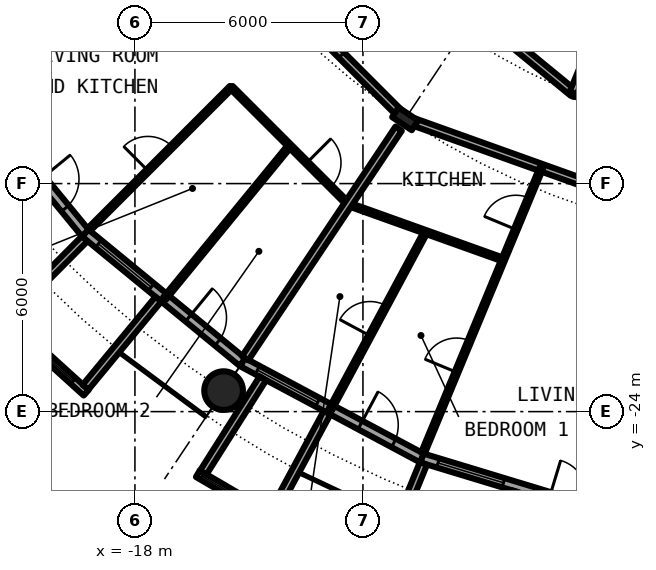
"""IFC4 building model, lengths in metres.
Left out: names, types, materials, properties, quantities, classifications, styles, units other than length and angle.
Written with IfcOpenShell. Run it as: python <this file> out.ifc"""

import sys

from ifc_helpers import new_model, si_unit, direction, frame, frame_2d, origin, origin_2d, place, context, subcontext, project, spatial, rectangle, circle, hollow_circle, i_section, extrude, element, fill, save


model = new_model("IFC4")
c1 = context("Model", 3, precision=1e-05, world=origin(), true_north=direction((0.0, 1.0)))
c2 = subcontext(c1, "Body", "Model", "MODEL_VIEW")
j1 = project(units=[si_unit("LENGTHUNIT", "METRE"), si_unit("PLANEANGLEUNIT", "RADIAN")], contexts=[c1])
p1 = place(None, origin())
s1 = spatial("IfcSite", under=j1, at=p1, CompositionType="ELEMENT")
p2 = place(p1, origin())
s2 = spatial("IfcBuilding", under=s1, at=p2, CompositionType="ELEMENT")
p3 = place(p2, frame((0.0, 0.0, 22.8)))
s3 = spatial("IfcBuildingStorey", under=s2, at=p3, CompositionType="ELEMENT", Elevation=22.8)
p4 = place(p3, frame((-15.667, -23.448, 0.0), z_axis=(0.0, 0.0, 1.0), x_axis=(1.0, 0.0, 0.0)))
e1 = element("IfcColumn", 1, at=p4, inside=s3, PredefinedType="COLUMN", context=c2, shape_type="SweptSolid", body=[
    extrude(hollow_circle(Radius=0.508, WallThickness=0.05, at=origin_2d()), origin(), (0.0, 0.0, 1.0), 3.05),
])
p5 = place(p3, frame((-10.889, -16.297, 0.0), z_axis=(0.0, 0.0, 1.0), x_axis=(-0.55557023302, -0.831469612303, 0.0)))
e2 = element("IfcColumn", 2, at=p5, inside=s3, PredefinedType="COLUMN", context=c2, shape_type="SweptSolid", body=[
    extrude(i_section(OverallWidth=0.305, OverallDepth=0.62, WebThickness=0.021, FlangeThickness=0.04, FilletRadius=0.027, at=origin_2d()), origin(), (0.0, 0.0, 1.0), 3.05),
])
p6 = place(p3, frame((-22.699, -15.167, 0.0), z_axis=(0.0, 0.0, 1.0), x_axis=(0.634382322723, -0.773019449054, 0.0)))
e3 = element("IfcWall", 3, at=p6, inside=s3, PredefinedType="SOLIDWALL", context=c2, shape_type="SweptSolid", body=[
    extrude(rectangle(XDim=5.352, YDim=0.25, at=frame_2d((2.676, 0.0))), origin(), (0.0, 0.0, 1.0), 2.7),
])
p7 = place(p6, frame((0.441, 0.0, 0.3)))
e4 = element("IfcOpeningElement", 4, at=p7, cuts=e3, PredefinedType="OPENING", context=c2, shape_type="SweptSolid", body=[
    extrude(rectangle(XDim=1.8, YDim=2.1, at=frame_2d((0.9, 1.05))), frame((0.0, 0.135, 0.0), z_axis=(0.0, -1.0, 0.0), x_axis=(1.0, 0.0, 0.0)), (0.0, 0.0, 1.0), 0.27),
])
p8 = place(p6, frame((3.51, 0.0, 0.0)))
e5 = element("IfcOpeningElement", 5, at=p8, cuts=e3, PredefinedType="OPENING", context=c2, shape_type="SweptSolid", body=[
    extrude(rectangle(XDim=1.0, YDim=2.2, at=frame_2d((0.5, 1.1))), frame((0.0, 0.135, 0.0), z_axis=(0.0, -1.0, 0.0), x_axis=(1.0, 0.0, 0.0)), (0.0, 0.0, 1.0), 0.27),
])
p9 = place(p3, frame((-19.304, -19.304, 0.0), z_axis=(0.0, 0.0, 1.0), x_axis=(0.773019449054, -0.634382322723, 0.0)))
e6 = element("IfcWall", 6, at=p9, inside=s3, PredefinedType="SOLIDWALL", context=c2, shape_type="SweptSolid", body=[
    extrude(rectangle(XDim=5.352, YDim=0.25, at=frame_2d((2.676, 0.0))), origin(), (0.0, 0.0, 1.0), 2.7),
])
p10 = place(p9, frame((0.441, 0.0, 0.3)))
e7 = element("IfcOpeningElement", 7, at=p10, cuts=e6, PredefinedType="OPENING", context=c2, shape_type="SweptSolid", body=[
    extrude(rectangle(XDim=1.8, YDim=2.1, at=frame_2d((0.9, 1.05))), frame((0.0, 0.135, 0.0), z_axis=(0.0, -1.0, 0.0), x_axis=(1.0, 0.0, 0.0)), (0.0, 0.0, 1.0), 0.27),
])
p11 = place(p9, frame((3.51, 0.0, 0.0)))
e8 = element("IfcOpeningElement", 8, at=p11, cuts=e6, PredefinedType="OPENING", context=c2, shape_type="SweptSolid", body=[
    extrude(rectangle(XDim=1.0, YDim=2.2, at=frame_2d((0.5, 1.1))), frame((0.0, 0.135, 0.0), z_axis=(0.0, -1.0, 0.0), x_axis=(1.0, 0.0, 0.0)), (0.0, 0.0, 1.0), 0.27),
])
p12 = place(p3, frame((-21.5, -21.493, -0.03), z_axis=(0.0, 0.0, 1.0), x_axis=(0.740998365753, -0.671506829416, 0.0)))
e9 = element("IfcWall", 9, at=p12, inside=s3, PredefinedType="SOLIDWALL", context=c2, shape_type="SweptSolid", body=[
    extrude(rectangle(XDim=2.993, YDim=0.2, at=frame_2d((1.497, 0.0))), origin(), (0.0, 0.0, 1.0), 2.73),
])
p13 = place(p12, frame((0.457, 0.0, 0.33)))
e10 = element("IfcOpeningElement", 10, at=p13, cuts=e9, PredefinedType="OPENING", context=c2, shape_type="SweptSolid", body=[
    extrude(circle(Radius=1.04, at=frame_2d((1.04, 1.04))), frame((0.0, 0.11, 0.0), z_axis=(0.0, -1.0, 0.0), x_axis=(1.0, 0.0, 0.0)), (0.0, 0.0, 1.0), 0.22),
])
p14 = place(p3, frame((-19.323, -19.45, -0.03), z_axis=(0.0, 0.0, 1.0), x_axis=(-0.704476739375, -0.709727076896, 0.0)))
e11 = element("IfcWall", 11, at=p14, inside=s3, PredefinedType="SOLIDWALL", context=c2, shape_type="SweptSolid", body=[
    extrude(rectangle(XDim=2.883, YDim=0.2, at=frame_2d((1.441, 0.0))), origin(), (0.0, 0.0, 1.0), 2.73),
])
p15 = place(p3, frame((-17.384, -21.041, -0.03), z_axis=(0.0, 0.0, 1.0), x_axis=(-0.63709551667, -0.770784861449, 0.0)))
e12 = element("IfcWall", 12, at=p15, inside=s3, PredefinedType="SOLIDWALL", context=c2, shape_type="SweptSolid", body=[
    extrude(rectangle(XDim=3.006, YDim=0.2, at=frame_2d((1.503, 0.0))), origin(), (0.0, 0.0, 1.0), 2.73),
])
p16 = place(p3, frame((-15.167, -22.699, 0.0), z_axis=(0.0, 0.0, 1.0), x_axis=(0.881915646801, -0.471407246368, 0.0)))
e13 = element("IfcWall", 13, at=p16, inside=s3, PredefinedType="SOLIDWALL", context=c2, shape_type="SweptSolid", body=[
    extrude(rectangle(XDim=5.352, YDim=0.25, at=frame_2d((2.676, 0.0))), origin(), (0.0, 0.0, 1.0), 2.7),
])
p17 = place(p16, frame((0.441, 0.0, 0.3)))
e14 = element("IfcOpeningElement", 14, at=p17, cuts=e13, PredefinedType="OPENING", context=c2, shape_type="SweptSolid", body=[
    extrude(rectangle(XDim=1.8, YDim=2.1, at=frame_2d((0.9, 1.05))), frame((0.0, 0.135, 0.0), z_axis=(0.0, -1.0, 0.0), x_axis=(1.0, 0.0, 0.0)), (0.0, 0.0, 1.0), 0.27),
])
p18 = place(p16, frame((3.51, 0.0, 0.0)))
e15 = element("IfcOpeningElement", 15, at=p18, cuts=e13, PredefinedType="OPENING", context=c2, shape_type="SweptSolid", body=[
    extrude(rectangle(XDim=1.0, YDim=2.2, at=frame_2d((0.5, 1.1))), frame((0.0, 0.135, 0.0), z_axis=(0.0, -1.0, 0.0), x_axis=(1.0, 0.0, 0.0)), (0.0, 0.0, 1.0), 0.27),
])
p19 = place(p3, frame((-16.344, -25.633, -0.03), z_axis=(0.0, 0.0, 1.0), x_axis=(0.863346521872, -0.504611517081, 0.0)))
e16 = element("IfcWall", 16, at=p19, inside=s3, PredefinedType="SOLIDWALL", context=c2, shape_type="SweptSolid", body=[
    extrude(rectangle(XDim=2.336, YDim=0.2, at=frame_2d((1.168, 0.0))), origin(), (0.0, 0.0, 1.0), 2.73),
])
p20 = place(p19, frame((0.128, 0.0, 0.33)))
e17 = element("IfcOpeningElement", 17, at=p20, cuts=e16, PredefinedType="OPENING", context=c2, shape_type="SweptSolid", body=[
    extrude(circle(Radius=1.04, at=frame_2d((1.04, 1.04))), frame((0.0, 0.11, 0.0), z_axis=(0.0, -1.0, 0.0), x_axis=(1.0, 0.0, 0.0)), (0.0, 0.0, 1.0), 0.22),
])
p21 = place(p3, frame((-14.635, -23.126, -0.03), z_axis=(0.0, 0.0, 1.0), x_axis=(-0.534437802731, -0.845207805816, 0.0)))
e18 = element("IfcWall", 18, at=p21, inside=s3, PredefinedType="SOLIDWALL", context=c2, shape_type="SweptSolid", body=[
    extrude(rectangle(XDim=2.932, YDim=0.2, at=frame_2d((1.466, 0.0))), origin(), (0.0, 0.0, 1.0), 2.73),
])
p22 = place(p3, frame((-12.945, -24.029, -0.03), z_axis=(0.0, 0.0, 1.0), x_axis=(-0.474424310775, -0.88029629861, 0.0)))
e19 = element("IfcWall", 19, at=p22, inside=s3, PredefinedType="SOLIDWALL", context=c2, shape_type="SweptSolid", body=[
    extrude(rectangle(XDim=3.006, YDim=0.2, at=frame_2d((1.503, 0.0))), origin(), (0.0, 0.0, 1.0), 2.73),
])
p23 = place(p3, frame((-10.447, -25.222, 0.0), z_axis=(0.0, 0.0, 1.0), x_axis=(0.956965678721, -0.290201119486, 0.0)))
e20 = element("IfcWall", 20, at=p23, inside=s3, PredefinedType="SOLIDWALL", context=c2, shape_type="SweptSolid", body=[
    extrude(rectangle(XDim=5.351, YDim=0.25, at=frame_2d((2.676, 0.0))), origin(), (0.0, 0.0, 1.0), 2.7),
])
p24 = place(p23, frame((0.441, 0.0, 0.3)))
e21 = element("IfcOpeningElement", 21, at=p24, cuts=e20, PredefinedType="OPENING", context=c2, shape_type="SweptSolid", body=[
    extrude(rectangle(XDim=1.8, YDim=2.1, at=frame_2d((0.9, 1.05))), frame((0.0, 0.135, 0.0), z_axis=(0.0, -1.0, 0.0), x_axis=(1.0, 0.0, 0.0)), (0.0, 0.0, 1.0), 0.27),
])
p25 = place(p23, frame((3.51, 0.0, 0.0)))
e22 = element("IfcOpeningElement", 22, at=p25, cuts=e20, PredefinedType="OPENING", context=c2, shape_type="SweptSolid", body=[
    extrude(rectangle(XDim=1.0, YDim=2.2, at=frame_2d((0.5, 1.1))), frame((0.0, 0.135, 0.0), z_axis=(0.0, -1.0, 0.0), x_axis=(1.0, 0.0, 0.0)), (0.0, 0.0, 1.0), 0.27),
])
p26 = place(p3, frame((-10.409, -25.364, -0.03), z_axis=(0.0, 0.0, 1.0), x_axis=(-0.379509886562, -0.925187681501, 0.0)))
e23 = element("IfcWall", 23, at=p26, inside=s3, PredefinedType="SOLIDWALL", context=c2, shape_type="SweptSolid", body=[
    extrude(rectangle(XDim=2.883, YDim=0.2, at=frame_2d((1.441, 0.0))), origin(), (0.0, 0.0, 1.0), 2.73),
])
p27 = place(p3, frame((-8.009, -26.092, -0.03), z_axis=(0.0, 0.0, 1.0), x_axis=(-0.293406695073, -0.955987715029, 0.0)))
e24 = element("IfcWall", 24, at=p27, inside=s3, PredefinedType="SOLIDWALL", context=c2, shape_type="SweptSolid", body=[
    extrude(rectangle(XDim=3.006, YDim=0.2, at=frame_2d((1.503, 0.0))), origin(), (0.0, 0.0, 1.0), 2.73),
])
p28 = place(p3, frame((-15.463, -15.468, 0.0), z_axis=(0.0, 0.0, 1.0), x_axis=(0.707106781187, -0.707106781187, 0.0)))
e25 = element("IfcWall", 25, at=p28, inside=s3, PredefinedType="PARTITIONING", context=c2, shape_type="SweptSolid", body=[
    extrude(rectangle(XDim=4.351, YDim=0.1, at=frame_2d((2.176, 0.0))), origin(), (0.0, 0.0, 1.0), 2.7),
])
p29 = place(p28, frame((2.808, 0.0, 0.0)))
e26 = element("IfcOpeningElement", 26, at=p29, cuts=e25, PredefinedType="OPENING", context=c2, shape_type="SweptSolid", body=[
    extrude(rectangle(XDim=0.9, YDim=2.3, at=frame_2d((0.45, 1.15))), frame((0.0, 0.06, 0.0), z_axis=(0.0, -1.0, 0.0), x_axis=(1.0, 0.0, 0.0)), (0.0, 0.0, 1.0), 0.12),
])
p30 = place(p3, frame((-12.389, -18.542, 0.0), z_axis=(0.0, 0.0, 1.0), x_axis=(0.941556976264, -0.336853767159, 0.0)))
e27 = element("IfcWall", 27, at=p30, inside=s3, PredefinedType="PARTITIONING", context=c2, shape_type="SweptSolid", body=[
    extrude(rectangle(XDim=4.334, YDim=0.1, at=frame_2d((2.167, 0.0))), origin(), (0.0, 0.0, 1.0), 2.7),
])
p31 = place(p3, frame((-16.187, -10.999, 0.0), z_axis=(0.0, 0.0, 1.0), x_axis=(0.707106781187, -0.707106781187, 0.0)))
e28 = element("IfcWall", 28, at=p31, inside=s3, PredefinedType="PARTITIONING", context=c2, shape_type="SweptSolid", body=[
    extrude(rectangle(XDim=7.337, YDim=0.2, at=frame_2d((3.668, 0.0))), origin(), (0.0, 0.0, 1.0), 2.38),
])
p32 = place(p31, frame((4.124, 0.0, 0.0)))
e29 = element("IfcOpeningElement", 29, at=p32, cuts=e28, PredefinedType="OPENING", context=c2, shape_type="SweptSolid", body=[
    extrude(rectangle(XDim=1.0, YDim=2.3, at=frame_2d((0.5, 1.15))), frame((0.0, 0.11, 0.0), z_axis=(0.0, -1.0, 0.0), x_axis=(1.0, 0.0, 0.0)), (0.0, 0.0, 1.0), 0.22),
])
p33 = place(p3, frame((-10.741, -16.35, 0.0), z_axis=(0.0, 0.0, 1.0), x_axis=(0.941539496009, -0.336902623105, 0.0)))
e30 = element("IfcWall", 30, at=p33, inside=s3, PredefinedType="PARTITIONING", context=c2, shape_type="SweptSolid", body=[
    extrude(rectangle(XDim=9.368, YDim=0.2, at=frame_2d((4.684, 0.0))), origin(), (0.0, 0.0, 1.0), 2.38),
])
p34 = place(p33, frame((5.057, 0.0, 0.0)))
e31 = element("IfcOpeningElement", 31, at=p34, cuts=e30, PredefinedType="OPENING", context=c2, shape_type="SweptSolid", body=[
    extrude(rectangle(XDim=1.0, YDim=2.3, at=frame_2d((0.5, 1.15))), frame((0.0, 0.11, 0.0), z_axis=(0.0, -1.0, 0.0), x_axis=(1.0, 0.0, 0.0)), (0.0, 0.0, 1.0), 0.22),
])
p35 = place(p3, frame((-14.038, -9.402, 0.0), z_axis=(0.0, 0.0, 1.0), x_axis=(0.773084654695, -0.634302858794, 0.0)))
e32 = element("IfcWall", 32, at=p35, inside=s3, PredefinedType="PARTITIONING", context=c2, shape_type="SweptSolid", body=[
    extrude(rectangle(XDim=9.793, YDim=0.2, at=frame_2d((4.896, 0.0))), origin(), (0.0, 0.0, 1.0), 2.7),
])
p36 = place(p35, frame((4.387, 0.0, 0.0)))
e33 = element("IfcOpeningElement", 33, at=p36, cuts=e32, PredefinedType="OPENING", context=c2, shape_type="SweptSolid", body=[
    extrude(rectangle(XDim=1.0, YDim=2.3, at=frame_2d((0.5, 1.15))), frame((0.0, 0.11, 0.0), z_axis=(0.0, -1.0, 0.0), x_axis=(1.0, 0.0, 0.0)), (0.0, 0.0, 1.0), 0.22),
])
p37 = place(p3, frame((-6.467, -15.615, 0.0), z_axis=(0.0, 0.0, 1.0), x_axis=(0.995201860711, -0.097843019361, 0.0)))
e34 = element("IfcWall", 34, at=p37, inside=s3, PredefinedType="PARTITIONING", context=c2, shape_type="SweptSolid", body=[
    extrude(rectangle(XDim=9.811, YDim=0.2, at=frame_2d((4.906, 0.0))), origin(), (0.0, 0.0, 1.0), 2.7),
])
p38 = place(p37, frame((4.405, 0.0, 0.0)))
e35 = element("IfcOpeningElement", 35, at=p38, cuts=e34, PredefinedType="OPENING", context=c2, shape_type="SweptSolid", body=[
    extrude(rectangle(XDim=1.0, YDim=2.3, at=frame_2d((0.5, 1.15))), frame((0.0, 0.11, 0.0), z_axis=(0.0, -1.0, 0.0), x_axis=(1.0, 0.0, 0.0)), (0.0, 0.0, 1.0), 0.22),
])
p39 = place(p3, frame((-22.595, -15.098, 0.0), z_axis=(0.0, 0.0, 1.0), x_axis=(0.831387096605, 0.55569370664, 0.0)))
e36 = element("IfcWall", 36, at=p39, inside=s3, PredefinedType="PARTITIONING", context=c2, shape_type="SweptSolid", body=[
    extrude(rectangle(XDim=4.875, YDim=0.2, at=frame_2d((2.438, 0.0))), origin(), (0.0, 0.0, 1.0), 2.7),
])
p40 = place(p3, frame((-19.216, -19.216, 0.0), z_axis=(0.0, 0.0, 1.0), x_axis=(0.707106781187, 0.707106781187, 0.0)))
e37 = element("IfcWall", 37, at=p40, inside=s3, PredefinedType="PARTITIONING", context=c2, shape_type="SweptSolid", body=[
    extrude(rectangle(XDim=5.305, YDim=0.1, at=frame_2d((2.652, 0.0))), origin(), (0.0, 0.0, 1.0), 2.7),
])
p41 = place(p40, frame((2.202, 0.0, 0.0)))
e38 = element("IfcOpeningElement", 38, at=p41, cuts=e37, PredefinedType="OPENING", context=c2, shape_type="SweptSolid", body=[
    extrude(rectangle(XDim=0.9, YDim=2.3, at=frame_2d((0.45, 1.15))), frame((0.0, 0.06, 0.0), z_axis=(0.0, -1.0, 0.0), x_axis=(1.0, 0.0, 0.0)), (0.0, 0.0, 1.0), 0.12),
])
p42 = place(p3, frame((-17.22, -21.023, 0.0), z_axis=(0.0, 0.0, 1.0), x_axis=(0.633774976367, 0.773517471898, 0.0)))
e39 = element("IfcWall", 39, at=p42, inside=s3, PredefinedType="PARTITIONING", context=c2, shape_type="SweptSolid", body=[
    extrude(rectangle(XDim=5.196, YDim=0.1, at=frame_2d((2.598, 0.0))), origin(), (0.0, 0.0, 1.0), 2.7),
])
p43 = place(p3, frame((-15.098, -22.595, 0.0), z_axis=(0.0, 0.0, 1.0), x_axis=(0.55566921314, 0.831403467378, 0.0)))
e40 = element("IfcWall", 40, at=p43, inside=s3, PredefinedType="PARTITIONING", context=c2, shape_type="SweptSolid", body=[
    extrude(rectangle(XDim=7.265, YDim=0.2, at=frame_2d((3.632, 0.0))), origin(), (0.0, 0.0, 1.0), 2.7),
])
p44 = place(p3, frame((-12.856, -23.942, 0.0), z_axis=(0.0, 0.0, 1.0), x_axis=(0.472967735543, 0.881079747319, 0.0)))
e41 = element("IfcWall", 41, at=p44, inside=s3, PredefinedType="PARTITIONING", context=c2, shape_type="SweptSolid", body=[
    extrude(rectangle(XDim=5.3, YDim=0.1, at=frame_2d((2.65, 0.0))), origin(), (0.0, 0.0, 1.0), 2.7),
])
p45 = place(p44, frame((2.2, 0.0, 0.0)))
e42 = element("IfcOpeningElement", 42, at=p45, cuts=e41, PredefinedType="OPENING", context=c2, shape_type="SweptSolid", body=[
    extrude(rectangle(XDim=0.9, YDim=2.3, at=frame_2d((0.45, 1.15))), frame((0.0, 0.06, 0.0), z_axis=(0.0, -1.0, 0.0), x_axis=(1.0, 0.0, 0.0)), (0.0, 0.0, 1.0), 0.12),
])
p46 = place(p3, frame((-10.424, -25.096, 0.0), z_axis=(0.0, 0.0, 1.0), x_axis=(0.383616168183, 0.923492628833, 0.0)))
e43 = element("IfcWall", 43, at=p46, inside=s3, PredefinedType="PARTITIONING", context=c2, shape_type="SweptSolid", body=[
    extrude(rectangle(XDim=8.138, YDim=0.1, at=frame_2d((4.069, 0.0))), origin(), (0.0, 0.0, 1.0), 2.7),
])
p47 = place(p46, frame((6.377, 0.0, 0.0)))
e44 = element("IfcOpeningElement", 44, at=p47, cuts=e43, PredefinedType="OPENING", context=c2, shape_type="SweptSolid", body=[
    extrude(rectangle(XDim=0.9, YDim=2.3, at=frame_2d((0.45, 1.15))), frame((0.0, 0.06, 0.0), z_axis=(0.0, -1.0, 0.0), x_axis=(1.0, 0.0, 0.0)), (0.0, 0.0, 1.0), 0.12),
])
p48 = place(p46, frame((2.308, 0.0, 0.0)))
e45 = element("IfcOpeningElement", 45, at=p48, cuts=e43, PredefinedType="OPENING", context=c2, shape_type="SweptSolid", body=[
    extrude(rectangle(XDim=0.9, YDim=2.3, at=frame_2d((0.45, 1.15))), frame((0.0, 0.06, 0.0), z_axis=(0.0, -1.0, 0.0), x_axis=(1.0, 0.0, 0.0)), (0.0, 0.0, 1.0), 0.12),
])
p49 = place(p3, frame((-6.467, -15.614, 0.0), z_axis=(0.0, 0.0, 1.0), x_axis=(0.382646942224, 0.923894646378, 0.0)))
e46 = element("IfcWall", 46, at=p49, inside=s3, PredefinedType="PARTITIONING", context=c2, shape_type="SweptSolid", body=[
    extrude(rectangle(XDim=9.181, YDim=0.2, at=frame_2d((4.59, 0.0))), origin(), (0.0, 0.0, 1.0), 2.7),
])
p50 = place(p8, origin())
e47 = element("IfcDoor", 47, at=p50, inside=s3, OperationType="SINGLE_SWING_LEFT", PredefinedType="DOOR", context=c2, shape_type="SweptSolid", body=[
    extrude(rectangle(XDim=1.0, YDim=2.2, at=frame_2d((0.5, 1.1))), frame((0.0, 0.025, 0.0), z_axis=(0.0, -1.0, 0.0), x_axis=(1.0, 0.0, 0.0)), (0.0, 0.0, 1.0), 0.05),
])
fill(e5, e47)
p51 = place(p10, origin())
e48 = element("IfcWindow", 48, at=p51, inside=s3, PartitioningType="SINGLE_PANEL", PredefinedType="WINDOW", context=c2, shape_type="SweptSolid", body=[
    extrude(rectangle(XDim=1.8, YDim=2.1, at=frame_2d((0.9, 1.05))), frame((0.0, 0.03, 0.0), z_axis=(0.0, -1.0, 0.0), x_axis=(1.0, 0.0, 0.0)), (0.0, 0.0, 1.0), 0.06),
])
fill(e7, e48)
p52 = place(p13, origin())
e49 = element("IfcWindow", 49, at=p52, inside=s3, PartitioningType="SINGLE_PANEL", PredefinedType="WINDOW", context=c2, shape_type="SweptSolid", body=[
    extrude(circle(Radius=1.04, at=frame_2d((1.04, 1.04))), frame((0.0, 0.03, 0.0), z_axis=(0.0, -1.0, 0.0), x_axis=(1.0, 0.0, 0.0)), (0.0, 0.0, 1.0), 0.06),
])
fill(e10, e49)
p53 = place(p11, origin())
e50 = element("IfcDoor", 50, at=p53, inside=s3, OperationType="SINGLE_SWING_LEFT", PredefinedType="DOOR", context=c2, shape_type="SweptSolid", body=[
    extrude(rectangle(XDim=1.0, YDim=2.2, at=frame_2d((0.5, 1.1))), frame((0.0, 0.025, 0.0), z_axis=(0.0, -1.0, 0.0), x_axis=(1.0, 0.0, 0.0)), (0.0, 0.0, 1.0), 0.05),
])
fill(e8, e50)
p54 = place(p17, origin())
e51 = element("IfcWindow", 51, at=p54, inside=s3, PartitioningType="SINGLE_PANEL", PredefinedType="WINDOW", context=c2, shape_type="SweptSolid", body=[
    extrude(rectangle(XDim=1.8, YDim=2.1, at=frame_2d((0.9, 1.05))), frame((0.0, 0.03, 0.0), z_axis=(0.0, -1.0, 0.0), x_axis=(1.0, 0.0, 0.0)), (0.0, 0.0, 1.0), 0.06),
])
fill(e14, e51)
p55 = place(p20, origin())
e52 = element("IfcWindow", 52, at=p55, inside=s3, PartitioningType="SINGLE_PANEL", PredefinedType="WINDOW", context=c2, shape_type="SweptSolid", body=[
    extrude(circle(Radius=1.04, at=frame_2d((1.04, 1.04))), frame((0.0, 0.03, 0.0), z_axis=(0.0, -1.0, 0.0), x_axis=(1.0, 0.0, 0.0)), (0.0, 0.0, 1.0), 0.06),
])
fill(e17, e52)
p56 = place(p18, origin())
e53 = element("IfcDoor", 53, at=p56, inside=s3, OperationType="SINGLE_SWING_LEFT", PredefinedType="DOOR", context=c2, shape_type="SweptSolid", body=[
    extrude(rectangle(XDim=1.0, YDim=2.2, at=frame_2d((0.5, 1.1))), frame((0.0, 0.025, 0.0), z_axis=(0.0, -1.0, 0.0), x_axis=(1.0, 0.0, 0.0)), (0.0, 0.0, 1.0), 0.05),
])
fill(e15, e53)
p57 = place(p24, origin())
e54 = element("IfcWindow", 54, at=p57, inside=s3, PartitioningType="SINGLE_PANEL", PredefinedType="WINDOW", context=c2, shape_type="SweptSolid", body=[
    extrude(rectangle(XDim=1.8, YDim=2.1, at=frame_2d((0.9, 1.05))), frame((0.0, 0.03, 0.0), z_axis=(0.0, -1.0, 0.0), x_axis=(1.0, 0.0, 0.0)), (0.0, 0.0, 1.0), 0.06),
])
fill(e21, e54)
p58 = place(p32, origin())
e55 = element("IfcDoor", 55, at=p58, inside=s3, OperationType="SINGLE_SWING_RIGHT", PredefinedType="DOOR", context=c2, shape_type="SweptSolid", body=[
    extrude(rectangle(XDim=1.0, YDim=2.3, at=frame_2d((0.5, 1.15))), frame((0.0, 0.025, 0.0), z_axis=(0.0, -1.0, 0.0), x_axis=(1.0, 0.0, 0.0)), (0.0, 0.0, 1.0), 0.05),
])
fill(e29, e55)
p59 = place(p41, origin())
e56 = element("IfcDoor", 56, at=p59, inside=s3, OperationType="SINGLE_SWING_LEFT", PredefinedType="DOOR", context=c2, shape_type="SweptSolid", body=[
    extrude(rectangle(XDim=0.9, YDim=2.3, at=frame_2d((0.45, 1.15))), frame((0.0, 0.025, 0.0), z_axis=(0.0, -1.0, 0.0), x_axis=(1.0, 0.0, 0.0)), (0.0, 0.0, 1.0), 0.05),
])
fill(e38, e56)
p60 = place(p29, origin())
e57 = element("IfcDoor", 57, at=p60, inside=s3, OperationType="SINGLE_SWING_RIGHT", PredefinedType="DOOR", context=c2, shape_type="SweptSolid", body=[
    extrude(rectangle(XDim=0.9, YDim=2.3, at=frame_2d((0.45, 1.15))), frame((0.0, 0.025, 0.0), z_axis=(0.0, -1.0, 0.0), x_axis=(1.0, 0.0, 0.0)), (0.0, 0.0, 1.0), 0.05),
])
fill(e26, e57)
p61 = place(p47, origin())
e58 = element("IfcDoor", 58, at=p61, inside=s3, OperationType="SINGLE_SWING_RIGHT", PredefinedType="DOOR", context=c2, shape_type="SweptSolid", body=[
    extrude(rectangle(XDim=0.9, YDim=2.3, at=frame_2d((0.45, 1.15))), frame((0.0, 0.025, 0.0), z_axis=(0.0, -1.0, 0.0), x_axis=(1.0, 0.0, 0.0)), (0.0, 0.0, 1.0), 0.05),
])
fill(e44, e58)
p62 = place(p48, origin())
e59 = element("IfcDoor", 59, at=p62, inside=s3, OperationType="SINGLE_SWING_LEFT", PredefinedType="DOOR", context=c2, shape_type="SweptSolid", body=[
    extrude(rectangle(XDim=0.9, YDim=2.3, at=frame_2d((0.45, 1.15))), frame((0.0, 0.025, 0.0), z_axis=(0.0, -1.0, 0.0), x_axis=(1.0, 0.0, 0.0)), (0.0, 0.0, 1.0), 0.05),
])
fill(e45, e59)
p63 = place(p45, origin())
e60 = element("IfcDoor", 60, at=p63, inside=s3, OperationType="SINGLE_SWING_RIGHT", PredefinedType="DOOR", context=c2, shape_type="SweptSolid", body=[
    extrude(rectangle(XDim=0.9, YDim=2.3, at=frame_2d((0.45, 1.15))), frame((0.0, 0.025, 0.0), z_axis=(0.0, -1.0, 0.0), x_axis=(1.0, 0.0, 0.0)), (0.0, 0.0, 1.0), 0.05),
])
fill(e42, e60)
save(model, sys.argv[1])
